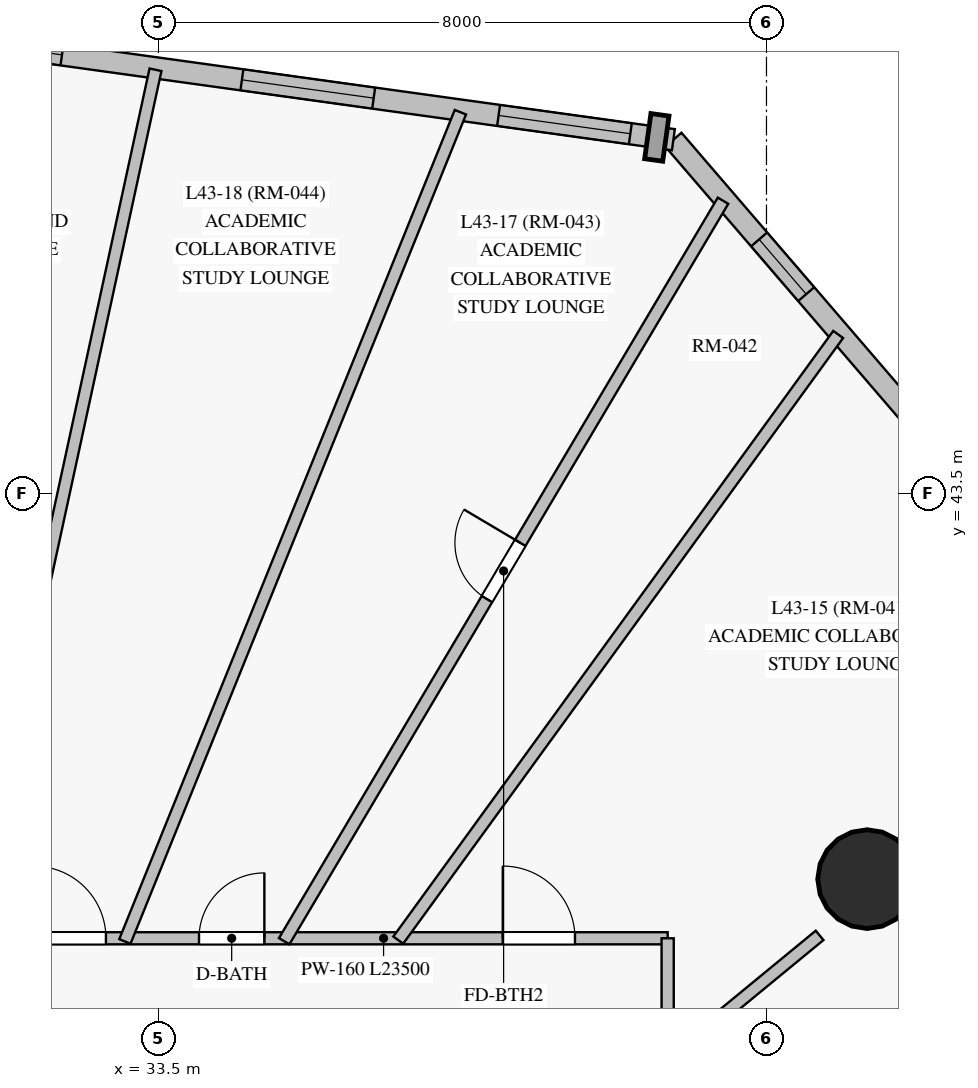
"""IFC4 building model, lengths in metres.
Left out: names, types, materials, properties, quantities, classifications, styles, units other than length and angle.
Written with IfcOpenShell. Run it as: python <this file> out.ifc"""

import sys

from ifc_helpers import new_model, si_unit, direction, frame, frame_2d, origin, origin_with_axes, origin_2d, place, context, subcontext, project, spatial, rectangle, circle, extrude, source, transform, mapped, element, fill, save


model = new_model("IFC4")
c1 = context("Model", 3, precision=1e-05, world=origin(), true_north=direction((0.0, 1.0)))
c2 = subcontext(c1, "Body", "Model", "MODEL_VIEW")
j1 = project(units=[si_unit("LENGTHUNIT", "METRE"), si_unit("PLANEANGLEUNIT", "RADIAN")], contexts=[c1])
p1 = place(None, origin())
s1 = spatial("IfcSite", under=j1, at=p1, CompositionType="ELEMENT")
p2 = place(p1, origin())
s2 = spatial("IfcBuilding", under=s1, at=p2, CompositionType="ELEMENT")
p3 = place(p2, frame((0.0, 0.0, 152.55)))
s3 = spatial("IfcBuildingStorey", under=s2, at=p3, CompositionType="ELEMENT", Elevation=152.55)
m1 = source(origin_with_axes(), c2, "Body", "SweptSolid", [
    extrude(circle(Radius=0.65, at=origin_2d()), origin(), (0.0, 0.0, 1.0), 4.0),
])
p4 = place(p3, frame((42.824, 38.428, 0.0), z_axis=(0.0, 0.0, 1.0), x_axis=(1.0, 0.0, 0.0)))
e1 = element("IfcColumn", 1, at=p4, inside=s3, PredefinedType="COLUMN", context=c2, shape_type="MappedRepresentation", body=[
    mapped(m1, transform((0.0, 0.0, 0.0), scale=1.0)),
])
p5 = place(p3, frame((46.398, 41.035, 0.0), z_axis=(0.0, 0.0, 1.0), x_axis=(-0.65197022464, 0.758244568845, 0.0)))
e2 = element("IfcWall", 2, at=p5, inside=s3, PredefinedType="SOLIDWALL", context=c2, shape_type="SweptSolid", body=[
    extrude(rectangle(XDim=9.391, YDim=0.28, at=frame_2d((4.696, 0.0))), origin(), (0.0, 0.0, 1.0), 3.775),
])
p6 = place(p5, frame((2.18, 0.0, 0.85)))
e3 = element("IfcOpeningElement", 3, at=p6, cuts=e2, PredefinedType="OPENING", context=c2, shape_type="SweptSolid", body=[
    extrude(rectangle(XDim=1.75, YDim=1.65, at=frame_2d((0.875, 0.825))), frame((0.0, 0.15, 0.0), z_axis=(0.0, -1.0, 0.0), x_axis=(1.0, 0.0, 0.0)), (0.0, 0.0, 1.0), 0.3),
])
p7 = place(p5, frame((6.711, 0.0, 0.85)))
e4 = element("IfcOpeningElement", 4, at=p7, cuts=e2, PredefinedType="OPENING", context=c2, shape_type="SweptSolid", body=[
    extrude(rectangle(XDim=0.95, YDim=1.5, at=frame_2d((0.475, 0.75))), frame((0.0, 0.15, 0.0), z_axis=(0.0, -1.0, 0.0), x_axis=(1.0, 0.0, 0.0)), (0.0, 0.0, 1.0), 0.3),
])
p8 = place(p3, frame((40.275, 48.156, 0.0), z_axis=(0.0, 0.0, 1.0), x_axis=(-0.990517311094, 0.137387977726, 0.0)))
e5 = element("IfcWall", 5, at=p8, inside=s3, PredefinedType="SOLIDWALL", context=c2, shape_type="SweptSolid", body=[
    extrude(rectangle(XDim=11.766, YDim=0.28, at=frame_2d((5.883, 0.0))), origin(), (0.0, 0.0, 1.0), 3.775),
])
p9 = place(p8, frame((0.572, 0.0, 0.85)))
e6 = element("IfcOpeningElement", 6, at=p9, cuts=e5, PredefinedType="OPENING", context=c2, shape_type="SweptSolid", body=[
    extrude(rectangle(XDim=1.75, YDim=1.65, at=frame_2d((0.875, 0.825))), frame((0.0, 0.15, 0.0), z_axis=(0.0, -1.0, 0.0), x_axis=(1.0, 0.0, 0.0)), (0.0, 0.0, 1.0), 0.3),
])
p10 = place(p8, frame((3.981, 0.0, 0.85)))
e7 = element("IfcOpeningElement", 7, at=p10, cuts=e5, PredefinedType="OPENING", context=c2, shape_type="SweptSolid", body=[
    extrude(rectangle(XDim=1.75, YDim=1.65, at=frame_2d((0.875, 0.825))), frame((0.0, 0.15, 0.0), z_axis=(0.0, -1.0, 0.0), x_axis=(1.0, 0.0, 0.0)), (0.0, 0.0, 1.0), 0.3),
])
p11 = place(p8, frame((8.121, 0.0, 0.85)))
e8 = element("IfcOpeningElement", 8, at=p11, cuts=e5, PredefinedType="OPENING", context=c2, shape_type="SweptSolid", body=[
    extrude(rectangle(XDim=1.75, YDim=1.65, at=frame_2d((0.875, 0.825))), frame((0.0, 0.15, 0.0), z_axis=(0.0, -1.0, 0.0), x_axis=(1.0, 0.0, 0.0)), (0.0, 0.0, 1.0), 0.3),
])
p12 = place(p3, frame((16.7, 37.65, 0.0), z_axis=(0.0, 0.0, 1.0), x_axis=(1.0, 0.0, 0.0)))
e9 = element("IfcWall", 9, at=p12, inside=s3, PredefinedType="PARTITIONING", context=c2, shape_type="SweptSolid", body=[
    extrude(rectangle(XDim=23.5, YDim=0.16, at=frame_2d((11.75, 0.0))), origin(), (0.0, 0.0, 1.0), 3.325),
])
p13 = place(p12, frame((21.331, 0.0, 0.0)))
e10 = element("IfcOpeningElement", 10, at=p13, cuts=e9, PredefinedType="OPENING", context=c2, shape_type="SweptSolid", body=[
    extrude(rectangle(XDim=0.95, YDim=2.15, at=frame_2d((0.475, 1.075))), frame((0.0, 0.09, 0.0), z_axis=(0.0, -1.0, 0.0), x_axis=(1.0, 0.0, 0.0)), (0.0, 0.0, 1.0), 0.18),
])
p14 = place(p12, frame((17.334, 0.0, 0.0)))
e11 = element("IfcOpeningElement", 11, at=p14, cuts=e9, PredefinedType="OPENING", context=c2, shape_type="SweptSolid", body=[
    extrude(rectangle(XDim=0.86, YDim=2.1, at=frame_2d((0.43, 1.05))), frame((0.0, 0.09, 0.0), z_axis=(0.0, -1.0, 0.0), x_axis=(1.0, 0.0, 0.0)), (0.0, 0.0, 1.0), 0.18),
])
p15 = place(p12, frame((15.16, 0.0, 0.0)))
e12 = element("IfcOpeningElement", 12, at=p15, cuts=e9, PredefinedType="OPENING", context=c2, shape_type="SweptSolid", body=[
    extrude(rectangle(XDim=0.95, YDim=2.15, at=frame_2d((0.475, 1.075))), frame((0.0, 0.09, 0.0), z_axis=(0.0, -1.0, 0.0), x_axis=(1.0, 0.0, 0.0)), (0.0, 0.0, 1.0), 0.18),
])
p16 = place(p12, frame((13.06, 0.0, 0.0)))
e13 = element("IfcOpeningElement", 13, at=p16, cuts=e9, PredefinedType="OPENING", context=c2, shape_type="SweptSolid", body=[
    extrude(rectangle(XDim=0.95, YDim=2.15, at=frame_2d((0.475, 1.075))), frame((0.0, 0.09, 0.0), z_axis=(0.0, -1.0, 0.0), x_axis=(1.0, 0.0, 0.0)), (0.0, 0.0, 1.0), 0.18),
])
p17 = place(p12, frame((10.973, 0.0, 0.0)))
e14 = element("IfcOpeningElement", 14, at=p17, cuts=e9, PredefinedType="OPENING", context=c2, shape_type="SweptSolid", body=[
    extrude(rectangle(XDim=0.95, YDim=2.15, at=frame_2d((0.475, 1.075))), frame((0.0, 0.09, 0.0), z_axis=(0.0, -1.0, 0.0), x_axis=(1.0, 0.0, 0.0)), (0.0, 0.0, 1.0), 0.18),
])
p18 = place(p12, frame((8.885, 0.0, 0.0)))
e15 = element("IfcOpeningElement", 15, at=p18, cuts=e9, PredefinedType="OPENING", context=c2, shape_type="SweptSolid", body=[
    extrude(rectangle(XDim=0.95, YDim=2.15, at=frame_2d((0.475, 1.075))), frame((0.0, 0.09, 0.0), z_axis=(0.0, -1.0, 0.0), x_axis=(1.0, 0.0, 0.0)), (0.0, 0.0, 1.0), 0.18),
])
p19 = place(p12, frame((6.61, 0.0, 0.0)))
e16 = element("IfcOpeningElement", 16, at=p19, cuts=e9, PredefinedType="OPENING", context=c2, shape_type="SweptSolid", body=[
    extrude(rectangle(XDim=0.95, YDim=2.15, at=frame_2d((0.475, 1.075))), frame((0.0, 0.09, 0.0), z_axis=(0.0, -1.0, 0.0), x_axis=(1.0, 0.0, 0.0)), (0.0, 0.0, 1.0), 0.18),
])
p20 = place(p12, frame((4.21, 0.0, 0.0)))
e17 = element("IfcOpeningElement", 17, at=p20, cuts=e9, PredefinedType="OPENING", context=c2, shape_type="SweptSolid", body=[
    extrude(rectangle(XDim=0.95, YDim=2.15, at=frame_2d((0.475, 1.075))), frame((0.0, 0.09, 0.0), z_axis=(0.0, -1.0, 0.0), x_axis=(1.0, 0.0, 0.0)), (0.0, 0.0, 1.0), 0.18),
])
p21 = place(p12, frame((2.482, 0.0, 0.0)))
e18 = element("IfcOpeningElement", 18, at=p21, cuts=e9, PredefinedType="OPENING", context=c2, shape_type="SweptSolid", body=[
    extrude(rectangle(XDim=0.95, YDim=2.15, at=frame_2d((0.475, 1.075))), frame((0.0, 0.09, 0.0), z_axis=(0.0, -1.0, 0.0), x_axis=(1.0, 0.0, 0.0)), (0.0, 0.0, 1.0), 0.18),
])
p22 = place(p3, frame((40.2, 37.65, 0.0), z_axis=(0.0, 0.0, 1.0), x_axis=(0.0, -1.0, 0.0)))
e19 = element("IfcWall", 19, at=p22, inside=s3, PredefinedType="PARTITIONING", context=c2, shape_type="SweptSolid", body=[
    extrude(rectangle(XDim=22.3, YDim=0.16, at=frame_2d((11.15, 0.0))), origin(), (0.0, 0.0, 1.0), 3.325),
])
p23 = place(p22, frame((16.25, 0.0, 0.0)))
e20 = element("IfcOpeningElement", 20, at=p23, cuts=e19, PredefinedType="OPENING", context=c2, shape_type="SweptSolid", body=[
    extrude(rectangle(XDim=0.95, YDim=2.15, at=frame_2d((0.475, 1.075))), frame((0.0, 0.09, 0.0), z_axis=(0.0, -1.0, 0.0), x_axis=(1.0, 0.0, 0.0)), (0.0, 0.0, 1.0), 0.18),
])
p24 = place(p22, frame((11.115, 0.0, 0.0)))
e21 = element("IfcOpeningElement", 21, at=p24, cuts=e19, PredefinedType="OPENING", context=c2, shape_type="SweptSolid", body=[
    extrude(rectangle(XDim=0.95, YDim=2.15, at=frame_2d((0.475, 1.075))), frame((0.0, 0.09, 0.0), z_axis=(0.0, -1.0, 0.0), x_axis=(1.0, 0.0, 0.0)), (0.0, 0.0, 1.0), 0.18),
])
p25 = place(p22, frame((7.33, 0.0, 0.0)))
e22 = element("IfcOpeningElement", 22, at=p25, cuts=e19, PredefinedType="OPENING", context=c2, shape_type="SweptSolid", body=[
    extrude(rectangle(XDim=0.95, YDim=2.15, at=frame_2d((0.475, 1.075))), frame((0.0, 0.09, 0.0), z_axis=(0.0, -1.0, 0.0), x_axis=(1.0, 0.0, 0.0)), (0.0, 0.0, 1.0), 0.18),
])
p26 = place(p22, frame((5.01, 0.0, 0.0)))
e23 = element("IfcOpeningElement", 23, at=p26, cuts=e19, PredefinedType="OPENING", context=c2, shape_type="SweptSolid", body=[
    extrude(rectangle(XDim=0.95, YDim=2.15, at=frame_2d((0.475, 1.075))), frame((0.0, 0.09, 0.0), z_axis=(0.0, -1.0, 0.0), x_axis=(1.0, 0.0, 0.0)), (0.0, 0.0, 1.0), 0.18),
])
p27 = place(p3, frame((33.059, 37.608, 0.0), z_axis=(0.0, 0.0, 1.0), x_axis=(0.375071800274, 0.926995763011, 0.0)))
e24 = element("IfcWall", 24, at=p27, inside=s3, PredefinedType="PARTITIONING", context=c2, shape_type="SweptSolid", body=[
    extrude(rectangle(XDim=11.769, YDim=0.16, at=frame_2d((5.884, 0.0))), origin(), (0.0, 0.0, 1.0), 3.775),
])
p28 = place(p3, frame((30.972, 37.606, 0.0), z_axis=(0.0, 0.0, 1.0), x_axis=(0.212126520702, 0.97724221113, 0.0)))
e25 = element("IfcWall", 25, at=p28, inside=s3, PredefinedType="PARTITIONING", context=c2, shape_type="SweptSolid", body=[
    extrude(rectangle(XDim=11.737, YDim=0.16, at=frame_2d((5.869, 0.0))), origin(), (0.0, 0.0, 1.0), 3.775),
])
p29 = place(p3, frame((35.155, 37.611, 0.0), z_axis=(0.0, 0.0, 1.0), x_axis=(0.509830756174, 0.860274723597, 0.0)))
e26 = element("IfcWall", 26, at=p29, inside=s3, PredefinedType="PARTITIONING", context=c2, shape_type="SweptSolid", body=[
    extrude(rectangle(XDim=11.324, YDim=0.16, at=frame_2d((5.662, 0.0))), origin(), (0.0, 0.0, 1.0), 3.775),
])
p30 = place(p29, frame((5.232, 0.0, 0.0)))
e27 = element("IfcOpeningElement", 27, at=p30, cuts=e26, PredefinedType="OPENING", context=c2, shape_type="SweptSolid", body=[
    extrude(rectangle(XDim=0.86, YDim=2.04, at=frame_2d((0.43, 1.02))), frame((0.0, 0.09, 0.0), z_axis=(0.0, -1.0, 0.0), x_axis=(1.0, 0.0, 0.0)), (0.0, 0.0, 1.0), 0.18),
])
p31 = place(p3, frame((36.656, 37.626, 0.0), z_axis=(0.0, 0.0, 1.0), x_axis=(0.587701388375, 0.809077918437, 0.0)))
e28 = element("IfcWall", 28, at=p31, inside=s3, PredefinedType="PARTITIONING", context=c2, shape_type="SweptSolid", body=[
    extrude(rectangle(XDim=9.848, YDim=0.16, at=frame_2d((4.924, 0.0))), origin(), (0.0, 0.0, 1.0), 3.775),
])
p32 = place(p3, frame((40.165, 36.015, 0.0), z_axis=(0.0, 0.0, 1.0), x_axis=(0.77233956331, 0.635209885743, 0.0)))
e29 = element("IfcWall", 29, at=p32, inside=s3, PredefinedType="PARTITIONING", context=c2, shape_type="SweptSolid", body=[
    extrude(rectangle(XDim=2.633, YDim=0.16, at=frame_2d((1.316, 0.0))), origin(), (0.0, 0.0, 1.0), 2.975),
])
m2 = source(origin_with_axes(), c2, "Body", "SweptSolid", [
    extrude(rectangle(XDim=0.95, YDim=1.5, at=frame_2d((0.475, 0.75))), frame((0.0, 0.03, 0.0), z_axis=(0.0, -1.0, 0.0), x_axis=(1.0, 0.0, 0.0)), (0.0, 0.0, 1.0), 0.06),
])
p33 = place(p7, origin())
e30 = element("IfcWindow", 30, at=p33, inside=s3, PartitioningType="SINGLE_PANEL", PredefinedType="WINDOW", context=c2, shape_type="MappedRepresentation", body=[
    mapped(m2, transform((0.0, 0.0, 0.0), scale=1.0)),
])
fill(e4, e30)
m3 = source(origin_with_axes(), c2, "Body", "SweptSolid", [
    extrude(rectangle(XDim=1.75, YDim=1.65, at=frame_2d((0.875, 0.825))), frame((0.0, 0.03, 0.0), z_axis=(0.0, -1.0, 0.0), x_axis=(1.0, 0.0, 0.0)), (0.0, 0.0, 1.0), 0.06),
])
p34 = place(p9, origin())
e31 = element("IfcWindow", 31, at=p34, inside=s3, PartitioningType="SINGLE_PANEL", PredefinedType="WINDOW", context=c2, shape_type="MappedRepresentation", body=[
    mapped(m3, transform((0.0, 0.0, 0.0), scale=1.0)),
])
fill(e6, e31)
p35 = place(p10, origin())
e32 = element("IfcWindow", 32, at=p35, inside=s3, PartitioningType="SINGLE_PANEL", PredefinedType="WINDOW", context=c2, shape_type="MappedRepresentation", body=[
    mapped(m3, transform((0.0, 0.0, 0.0), scale=1.0)),
])
fill(e7, e32)
p36 = place(p11, origin())
e33 = element("IfcWindow", 33, at=p36, inside=s3, PartitioningType="SINGLE_PANEL", PredefinedType="WINDOW", context=c2, shape_type="MappedRepresentation", body=[
    mapped(m3, transform((0.0, 0.0, 0.0), scale=1.0)),
])
fill(e8, e33)
m4 = source(origin_with_axes(), c2, "Body", "SweptSolid", [
    extrude(rectangle(XDim=0.95, YDim=2.15, at=frame_2d((0.475, 1.075))), frame((0.0, 0.025, 0.0), z_axis=(0.0, -1.0, 0.0), x_axis=(1.0, 0.0, 0.0)), (0.0, 0.0, 1.0), 0.05),
])
p37 = place(p13, origin())
e34 = element("IfcDoor", 34, at=p37, inside=s3, OperationType="SINGLE_SWING_LEFT", PredefinedType="DOOR", context=c2, shape_type="MappedRepresentation", body=[
    mapped(m4, transform((0.0, 0.0, 0.0), scale=1.0)),
])
fill(e10, e34)
m5 = source(origin_with_axes(), c2, "Body", "SweptSolid", [
    extrude(rectangle(XDim=0.86, YDim=2.1, at=frame_2d((0.43, 1.05))), frame((0.0, 0.025, 0.0), z_axis=(0.0, -1.0, 0.0), x_axis=(1.0, 0.0, 0.0)), (0.0, 0.0, 1.0), 0.05),
])
p38 = place(p14, origin())
e35 = element("IfcDoor", 35, at=p38, inside=s3, OperationType="SINGLE_SWING_RIGHT", PredefinedType="DOOR", context=c2, shape_type="MappedRepresentation", body=[
    mapped(m5, transform((0.0, 0.0, 0.0), scale=1.0)),
])
fill(e11, e35)
p39 = place(p15, origin())
e36 = element("IfcDoor", 36, at=p39, inside=s3, OperationType="SINGLE_SWING_LEFT", PredefinedType="DOOR", context=c2, shape_type="MappedRepresentation", body=[
    mapped(m4, transform((0.0, 0.0, 0.0), scale=1.0)),
])
fill(e12, e36)
m6 = source(origin_with_axes(), c2, "Body", "SweptSolid", [
    extrude(rectangle(XDim=0.86, YDim=2.04, at=frame_2d((0.43, 1.02))), frame((0.0, 0.025, 0.0), z_axis=(0.0, -1.0, 0.0), x_axis=(1.0, 0.0, 0.0)), (0.0, 0.0, 1.0), 0.05),
])
p40 = place(p30, origin())
e37 = element("IfcDoor", 37, at=p40, inside=s3, OperationType="SINGLE_SWING_RIGHT", PredefinedType="DOOR", context=c2, shape_type="MappedRepresentation", body=[
    mapped(m6, transform((0.0, 0.0, 0.0), scale=1.0)),
])
fill(e27, e37)
save(model, sys.argv[1])
